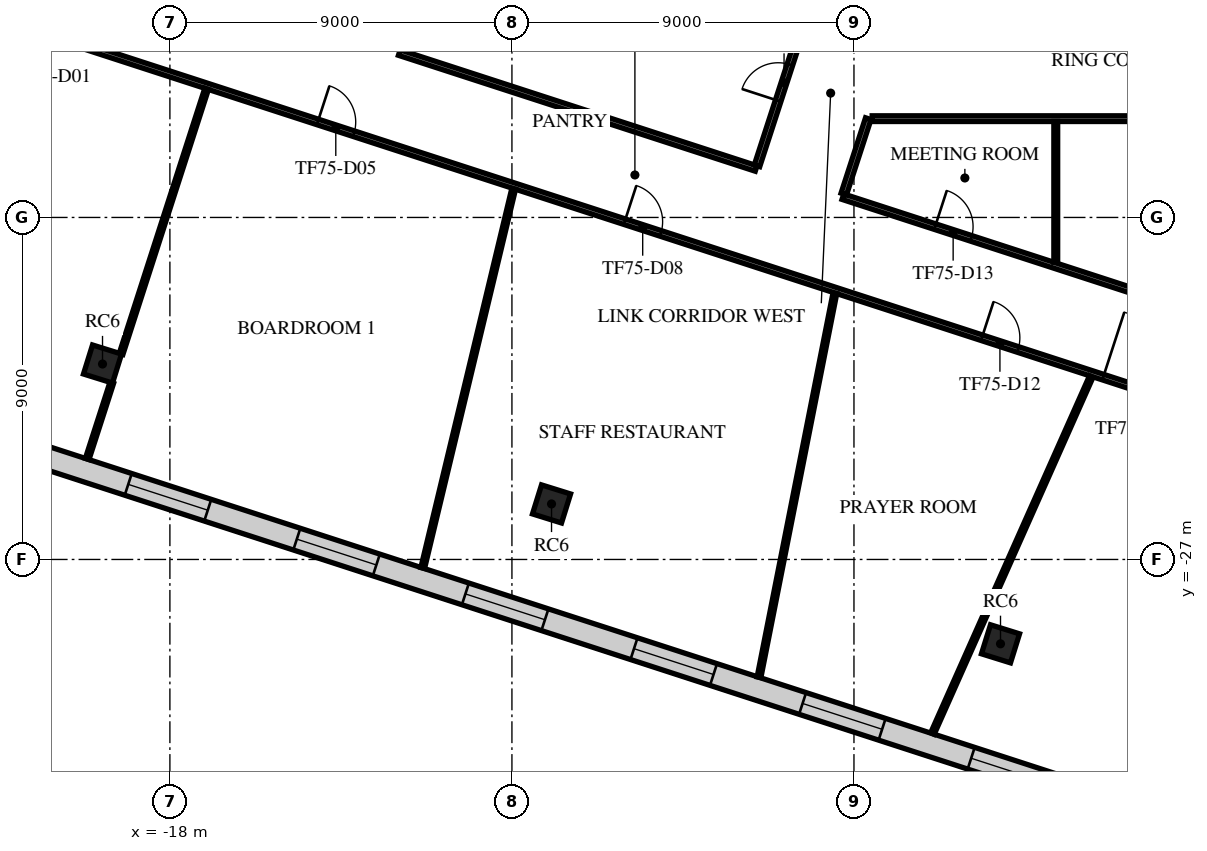
"""IFC4 building model, lengths in metres.
Left out: names, types, materials, properties, quantities, classifications, styles, units other than length and angle.
Written with IfcOpenShell. Run it as: python <this file> out.ifc"""

import sys

from ifc_helpers import new_model, si_unit, direction, frame, frame_2d, origin, origin_2d, place, context, subcontext, project, spatial, rectangle, extrude, element, fill, save


model = new_model("IFC4")
c1 = context("Model", 3, precision=1e-05, world=origin(), true_north=direction((0.0, 1.0)))
c2 = subcontext(c1, "Body", "Model", "MODEL_VIEW")
j1 = project(units=[si_unit("LENGTHUNIT", "METRE"), si_unit("PLANEANGLEUNIT", "RADIAN")], contexts=[c1])
p1 = place(None, origin())
s1 = spatial("IfcSite", under=j1, at=p1, CompositionType="ELEMENT")
p2 = place(p1, origin())
s2 = spatial("IfcBuilding", under=s1, at=p2, CompositionType="ELEMENT")
p3 = place(p2, frame((0.0, 0.0, 316.5)))
s3 = spatial("IfcBuildingStorey", under=s2, at=p3, CompositionType="ELEMENT", Elevation=316.5)
for number, where, z_axis, x_axis in (
    (1, (-19.773, -21.857, 0.0), (0.0, 0.0, 1.0), (0.298, 0.955, 0.0)),
    (2, (-7.958, -25.539, 0.0), (0.0, 0.0, 1.0), (0.298, 0.955, 0.0)),
    (3, (3.856, -29.22, 0.0), (0.0, 0.0, 1.0), (0.298, 0.955, 0.0)),
):
    element("IfcColumn", number, at=place(p3, frame(where, z_axis=z_axis, x_axis=x_axis)), inside=s3, PredefinedType="COLUMN", context=c2, shape_type="SweptSolid", body=[
        extrude(rectangle(XDim=0.8, YDim=0.8, at=origin_2d()), origin(), (0.0, 0.0, 1.0), 4.0),
    ])
p4 = place(p3, frame((-17.822, 31.552, 0.0), z_axis=(0.0, 0.0, 1.0), x_axis=(-0.309018218247, -0.951056118634, 0.0)))
e4 = element("IfcWall", 4, at=p4, inside=s3, PredefinedType="STANDARD", context=c2, shape_type="SweptSolid", body=[
    extrude(rectangle(XDim=48.49, YDim=0.6, at=frame_2d((24.245, 0.0))), origin(), (0.0, 0.0, 1.0), 3.65),
])
p5 = place(p4, frame((1.204, 0.0, 0.9)))
e5 = element("IfcOpeningElement", 5, at=p5, cuts=e4, PredefinedType="OPENING", context=c2, shape_type="SweptSolid", body=[
    extrude(rectangle(XDim=2.0, YDim=2.1, at=frame_2d((1.0, 1.05))), frame((0.0, 0.31, 0.0), z_axis=(0.0, -1.0, 0.0), x_axis=(1.0, 0.0, 0.0)), (0.0, 0.0, 1.0), 0.62),
])
p6 = place(p4, frame((5.612, 0.0, 0.9)))
e6 = element("IfcOpeningElement", 6, at=p6, cuts=e4, PredefinedType="OPENING", context=c2, shape_type="SweptSolid", body=[
    extrude(rectangle(XDim=2.0, YDim=2.1, at=frame_2d((1.0, 1.05))), frame((0.0, 0.31, 0.0), z_axis=(0.0, -1.0, 0.0), x_axis=(1.0, 0.0, 0.0)), (0.0, 0.0, 1.0), 0.62),
])
p7 = place(p4, frame((10.021, 0.0, 0.9)))
e7 = element("IfcOpeningElement", 7, at=p7, cuts=e4, PredefinedType="OPENING", context=c2, shape_type="SweptSolid", body=[
    extrude(rectangle(XDim=2.0, YDim=2.1, at=frame_2d((1.0, 1.05))), frame((0.0, 0.31, 0.0), z_axis=(0.0, -1.0, 0.0), x_axis=(1.0, 0.0, 0.0)), (0.0, 0.0, 1.0), 0.62),
])
p8 = place(p4, frame((14.428, 0.0, 0.9)))
e8 = element("IfcOpeningElement", 8, at=p8, cuts=e4, PredefinedType="OPENING", context=c2, shape_type="SweptSolid", body=[
    extrude(rectangle(XDim=2.0, YDim=2.1, at=frame_2d((1.0, 1.05))), frame((0.0, 0.31, 0.0), z_axis=(0.0, -1.0, 0.0), x_axis=(1.0, 0.0, 0.0)), (0.0, 0.0, 1.0), 0.62),
])
p9 = place(p4, frame((18.837, 0.0, 0.9)))
e9 = element("IfcOpeningElement", 9, at=p9, cuts=e4, PredefinedType="OPENING", context=c2, shape_type="SweptSolid", body=[
    extrude(rectangle(XDim=2.0, YDim=2.1, at=frame_2d((1.0, 1.05))), frame((0.0, 0.31, 0.0), z_axis=(0.0, -1.0, 0.0), x_axis=(1.0, 0.0, 0.0)), (0.0, 0.0, 1.0), 0.62),
])
p10 = place(p4, frame((23.245, 0.0, 0.9)))
e10 = element("IfcOpeningElement", 10, at=p10, cuts=e4, PredefinedType="OPENING", context=c2, shape_type="SweptSolid", body=[
    extrude(rectangle(XDim=2.0, YDim=2.1, at=frame_2d((1.0, 1.05))), frame((0.0, 0.31, 0.0), z_axis=(0.0, -1.0, 0.0), x_axis=(1.0, 0.0, 0.0)), (0.0, 0.0, 1.0), 0.62),
])
p11 = place(p4, frame((27.653, 0.0, 0.9)))
e11 = element("IfcOpeningElement", 11, at=p11, cuts=e4, PredefinedType="OPENING", context=c2, shape_type="SweptSolid", body=[
    extrude(rectangle(XDim=2.0, YDim=2.1, at=frame_2d((1.0, 1.05))), frame((0.0, 0.31, 0.0), z_axis=(0.0, -1.0, 0.0), x_axis=(1.0, 0.0, 0.0)), (0.0, 0.0, 1.0), 0.62),
])
p12 = place(p4, frame((32.061, 0.0, 0.9)))
e12 = element("IfcOpeningElement", 12, at=p12, cuts=e4, PredefinedType="OPENING", context=c2, shape_type="SweptSolid", body=[
    extrude(rectangle(XDim=2.0, YDim=2.1, at=frame_2d((1.0, 1.05))), frame((0.0, 0.31, 0.0), z_axis=(0.0, -1.0, 0.0), x_axis=(1.0, 0.0, 0.0)), (0.0, 0.0, 1.0), 0.62),
])
p13 = place(p4, frame((36.469, 0.0, 0.9)))
e13 = element("IfcOpeningElement", 13, at=p13, cuts=e4, PredefinedType="OPENING", context=c2, shape_type="SweptSolid", body=[
    extrude(rectangle(XDim=2.0, YDim=2.1, at=frame_2d((1.0, 1.05))), frame((0.0, 0.31, 0.0), z_axis=(0.0, -1.0, 0.0), x_axis=(1.0, 0.0, 0.0)), (0.0, 0.0, 1.0), 0.62),
])
p14 = place(p4, frame((40.877, 0.0, 0.9)))
e14 = element("IfcOpeningElement", 14, at=p14, cuts=e4, PredefinedType="OPENING", context=c2, shape_type="SweptSolid", body=[
    extrude(rectangle(XDim=2.0, YDim=2.1, at=frame_2d((1.0, 1.05))), frame((0.0, 0.31, 0.0), z_axis=(0.0, -1.0, 0.0), x_axis=(1.0, 0.0, 0.0)), (0.0, 0.0, 1.0), 0.62),
])
p15 = place(p4, frame((45.285, 0.0, 0.9)))
e15 = element("IfcOpeningElement", 15, at=p15, cuts=e4, PredefinedType="OPENING", context=c2, shape_type="SweptSolid", body=[
    extrude(rectangle(XDim=2.0, YDim=2.1, at=frame_2d((1.0, 1.05))), frame((0.0, 0.31, 0.0), z_axis=(0.0, -1.0, 0.0), x_axis=(1.0, 0.0, 0.0)), (0.0, 0.0, 1.0), 0.62),
])
p16 = place(p3, frame((-29.14, -21.76, 0.0), z_axis=(0.0, 0.0, 1.0), x_axis=(0.951057273207, -0.309014664831, 0.0)))
e16 = element("IfcWall", 16, at=p16, inside=s3, PredefinedType="STANDARD", context=c2, shape_type="SweptSolid", body=[
    extrude(rectangle(XDim=41.979, YDim=0.6, at=frame_2d((20.99, 0.0))), origin(), (0.0, 0.0, 1.0), 3.65),
])
p17 = place(p16, frame((1.232, 0.0, 0.9)))
e17 = element("IfcOpeningElement", 17, at=p17, cuts=e16, PredefinedType="OPENING", context=c2, shape_type="SweptSolid", body=[
    extrude(rectangle(XDim=2.2, YDim=2.1, at=frame_2d((1.1, 1.05))), frame((0.0, 0.31, 0.0), z_axis=(0.0, -1.0, 0.0), x_axis=(1.0, 0.0, 0.0)), (0.0, 0.0, 1.0), 0.62),
])
p18 = place(p16, frame((5.896, 0.0, 0.9)))
e18 = element("IfcOpeningElement", 18, at=p18, cuts=e16, PredefinedType="OPENING", context=c2, shape_type="SweptSolid", body=[
    extrude(rectangle(XDim=2.2, YDim=2.1, at=frame_2d((1.1, 1.05))), frame((0.0, 0.31, 0.0), z_axis=(0.0, -1.0, 0.0), x_axis=(1.0, 0.0, 0.0)), (0.0, 0.0, 1.0), 0.62),
])
p19 = place(p16, frame((10.561, 0.0, 0.9)))
e19 = element("IfcOpeningElement", 19, at=p19, cuts=e16, PredefinedType="OPENING", context=c2, shape_type="SweptSolid", body=[
    extrude(rectangle(XDim=2.2, YDim=2.1, at=frame_2d((1.1, 1.05))), frame((0.0, 0.31, 0.0), z_axis=(0.0, -1.0, 0.0), x_axis=(1.0, 0.0, 0.0)), (0.0, 0.0, 1.0), 0.62),
])
p20 = place(p16, frame((15.225, 0.0, 0.9)))
e20 = element("IfcOpeningElement", 20, at=p20, cuts=e16, PredefinedType="OPENING", context=c2, shape_type="SweptSolid", body=[
    extrude(rectangle(XDim=2.2, YDim=2.1, at=frame_2d((1.1, 1.05))), frame((0.0, 0.31, 0.0), z_axis=(0.0, -1.0, 0.0), x_axis=(1.0, 0.0, 0.0)), (0.0, 0.0, 1.0), 0.62),
])
p21 = place(p16, frame((19.89, 0.0, 0.9)))
e21 = element("IfcOpeningElement", 21, at=p21, cuts=e16, PredefinedType="OPENING", context=c2, shape_type="SweptSolid", body=[
    extrude(rectangle(XDim=2.2, YDim=2.1, at=frame_2d((1.1, 1.05))), frame((0.0, 0.31, 0.0), z_axis=(0.0, -1.0, 0.0), x_axis=(1.0, 0.0, 0.0)), (0.0, 0.0, 1.0), 0.62),
])
p22 = place(p16, frame((24.554, 0.0, 0.9)))
e22 = element("IfcOpeningElement", 22, at=p22, cuts=e16, PredefinedType="OPENING", context=c2, shape_type="SweptSolid", body=[
    extrude(rectangle(XDim=2.2, YDim=2.1, at=frame_2d((1.1, 1.05))), frame((0.0, 0.31, 0.0), z_axis=(0.0, -1.0, 0.0), x_axis=(1.0, 0.0, 0.0)), (0.0, 0.0, 1.0), 0.62),
])
p23 = place(p16, frame((29.218, 0.0, 0.9)))
e23 = element("IfcOpeningElement", 23, at=p23, cuts=e16, PredefinedType="OPENING", context=c2, shape_type="SweptSolid", body=[
    extrude(rectangle(XDim=2.2, YDim=2.1, at=frame_2d((1.1, 1.05))), frame((0.0, 0.31, 0.0), z_axis=(0.0, -1.0, 0.0), x_axis=(1.0, 0.0, 0.0)), (0.0, 0.0, 1.0), 0.62),
])
p24 = place(p16, frame((33.883, 0.0, 0.9)))
e24 = element("IfcOpeningElement", 24, at=p24, cuts=e16, PredefinedType="OPENING", context=c2, shape_type="SweptSolid", body=[
    extrude(rectangle(XDim=2.2, YDim=2.1, at=frame_2d((1.1, 1.05))), frame((0.0, 0.31, 0.0), z_axis=(0.0, -1.0, 0.0), x_axis=(1.0, 0.0, 0.0)), (0.0, 0.0, 1.0), 0.62),
])
p25 = place(p16, frame((38.547, 0.0, 0.9)))
e25 = element("IfcOpeningElement", 25, at=p25, cuts=e16, PredefinedType="OPENING", context=c2, shape_type="SweptSolid", body=[
    extrude(rectangle(XDim=2.2, YDim=2.1, at=frame_2d((1.1, 1.05))), frame((0.0, 0.31, 0.0), z_axis=(0.0, -1.0, 0.0), x_axis=(1.0, 0.0, 0.0)), (0.0, 0.0, 1.0), 0.62),
])
p26 = place(p3, frame((-22.763, -12.676, 0.0), z_axis=(0.0, 0.0, 1.0), x_axis=(0.951055018443, -0.309021604252, 0.0)))
e26 = element("IfcWall", 26, at=p26, inside=s3, PredefinedType="PARTITIONING", context=c2, shape_type="SweptSolid", body=[
    extrude(rectangle(XDim=35.537, YDim=0.15, at=frame_2d((17.769, 0.0))), origin(), (0.0, 0.0, 1.0), 3.25),
])
p27 = place(p26, frame((0.8, 0.0, 0.0)))
e27 = element("IfcOpeningElement", 27, at=p27, cuts=e26, PredefinedType="OPENING", context=c2, shape_type="SweptSolid", body=[
    extrude(rectangle(XDim=1.8, YDim=2.1, at=frame_2d((0.9, 1.05))), frame((0.0, 0.085, 0.0), z_axis=(0.0, -1.0, 0.0), x_axis=(1.0, 0.0, 0.0)), (0.0, 0.0, 1.0), 0.17),
])
p28 = place(p26, frame((9.098, 0.0, 0.0)))
e28 = element("IfcOpeningElement", 28, at=p28, cuts=e26, PredefinedType="OPENING", context=c2, shape_type="SweptSolid", body=[
    extrude(rectangle(XDim=1.0, YDim=2.1, at=frame_2d((0.5, 1.05))), frame((0.0, 0.085, 0.0), z_axis=(0.0, -1.0, 0.0), x_axis=(1.0, 0.0, 0.0)), (0.0, 0.0, 1.0), 0.17),
])
p29 = place(p26, frame((17.589, 0.0, 0.0)))
e29 = element("IfcOpeningElement", 29, at=p29, cuts=e26, PredefinedType="OPENING", context=c2, shape_type="SweptSolid", body=[
    extrude(rectangle(XDim=1.0, YDim=2.1, at=frame_2d((0.5, 1.05))), frame((0.0, 0.085, 0.0), z_axis=(0.0, -1.0, 0.0), x_axis=(1.0, 0.0, 0.0)), (0.0, 0.0, 1.0), 0.17),
])
p30 = place(p26, frame((27.473, 0.0, 0.0)))
e30 = element("IfcOpeningElement", 30, at=p30, cuts=e26, PredefinedType="OPENING", context=c2, shape_type="SweptSolid", body=[
    extrude(rectangle(XDim=1.0, YDim=2.1, at=frame_2d((0.5, 1.05))), frame((0.0, 0.085, 0.0), z_axis=(0.0, -1.0, 0.0), x_axis=(1.0, 0.0, 0.0)), (0.0, 0.0, 1.0), 0.17),
])
p31 = place(p26, frame((30.83, 0.0, 0.0)))
e31 = element("IfcOpeningElement", 31, at=p31, cuts=e26, PredefinedType="OPENING", context=c2, shape_type="SweptSolid", body=[
    extrude(rectangle(XDim=1.8, YDim=2.1, at=frame_2d((0.9, 1.05))), frame((0.0, 0.085, 0.0), z_axis=(0.0, -1.0, 0.0), x_axis=(1.0, 0.0, 0.0)), (0.0, 0.0, 1.0), 0.17),
])
p32 = place(p3, frame((-11.963, -13.662, 0.0), z_axis=(0.0, 0.0, 1.0), x_axis=(0.951081492471, -0.308940115036, 0.0)))
e32 = element("IfcWall", 32, at=p32, inside=s3, PredefinedType="PARTITIONING", context=c2, shape_type="SweptSolid", body=[
    extrude(rectangle(XDim=9.872, YDim=0.15, at=frame_2d((4.936, 0.0))), origin(), (0.0, 0.0, 1.0), 3.25),
])
p33 = place(p3, frame((-2.551, -16.641, 0.0), z_axis=(0.0, 0.0, 1.0), x_axis=(0.309172730038, 0.951005900613, 0.0)))
e33 = element("IfcWall", 33, at=p33, inside=s3, PredefinedType="PARTITIONING", context=c2, shape_type="SweptSolid", body=[
    extrude(rectangle(XDim=4.459, YDim=0.15, at=frame_2d((2.229, 0.0))), origin(), (0.0, 0.0, 1.0), 3.25),
])
p34 = place(p33, frame((1.8, 0.0, 0.0)))
e34 = element("IfcOpeningElement", 34, at=p34, cuts=e33, PredefinedType="OPENING", context=c2, shape_type="SweptSolid", body=[
    extrude(rectangle(XDim=1.0, YDim=2.1, at=frame_2d((0.5, 1.05))), frame((0.0, 0.085, 0.0), z_axis=(0.0, -1.0, 0.0), x_axis=(1.0, 0.0, 0.0)), (0.0, 0.0, 1.0), 0.17),
])
p35 = place(p3, frame((-0.291, -17.454, 0.0), z_axis=(0.0, 0.0, 1.0), x_axis=(0.951062767237, -0.308997755292, 0.0)))
e35 = element("IfcWall", 35, at=p35, inside=s3, PredefinedType="PARTITIONING", context=c2, shape_type="SweptSolid", body=[
    extrude(rectangle(XDim=12.689, YDim=0.15, at=frame_2d((6.344, 0.0))), origin(), (0.0, 0.0, 1.0), 3.25),
])
p36 = place(p35, frame((2.55, 0.0, 0.0)))
e36 = element("IfcOpeningElement", 36, at=p36, cuts=e35, PredefinedType="OPENING", context=c2, shape_type="SweptSolid", body=[
    extrude(rectangle(XDim=1.0, YDim=2.1, at=frame_2d((0.5, 1.05))), frame((0.0, 0.085, 0.0), z_axis=(0.0, -1.0, 0.0), x_axis=(1.0, 0.0, 0.0)), (0.0, 0.0, 1.0), 0.17),
])
p37 = place(p3, frame((-0.268, -17.383, 0.0), z_axis=(0.0, 0.0, 1.0), x_axis=(0.308805378048, 0.951125248581, 0.0)))
e37 = element("IfcWall", 37, at=p37, inside=s3, PredefinedType="PARTITIONING", context=c2, shape_type="SweptSolid", body=[
    extrude(rectangle(XDim=2.085, YDim=0.15, at=frame_2d((1.042, 0.0))), origin(), (0.0, 0.0, 1.0), 3.65),
])
p38 = place(p3, frame((0.479, -15.4, 0.0), z_axis=(0.0, 0.0, 1.0), x_axis=(1.0, 0.0, 0.0)))
e38 = element("IfcWall", 38, at=p38, inside=s3, PredefinedType="PARTITIONING", context=c2, shape_type="SweptSolid", body=[
    extrude(rectangle(XDim=14.921, YDim=0.15, at=frame_2d((7.46, 0.0))), origin(), (0.0, 0.0, 1.0), 3.25),
])
p39 = place(p3, frame((-20.176, -24.355, 0.0), z_axis=(0.0, 0.0, 1.0), x_axis=(0.307097655816, 0.951678007412, 0.0)))
e39 = element("IfcWall", 39, at=p39, inside=s3, PredefinedType="PARTITIONING", context=c2, shape_type="SweptSolid", body=[
    extrude(rectangle(XDim=2.105, YDim=0.1, at=frame_2d((1.053, 0.0))), origin(), (0.0, 0.0, 1.0), 3.65),
])
p40 = place(p3, frame((-19.284, -21.59, 0.0), z_axis=(0.0, 0.0, 1.0), x_axis=(0.307047557854, 0.951694172103, 0.0)))
e40 = element("IfcWall", 40, at=p40, inside=s3, PredefinedType="PARTITIONING", context=c2, shape_type="SweptSolid", body=[
    extrude(rectangle(XDim=7.328, YDim=0.1, at=frame_2d((3.664, 0.0))), origin(), (0.0, 0.0, 1.0), 3.25),
])
p41 = place(p3, frame((-11.347, -27.224, 0.0), z_axis=(0.0, 0.0, 1.0), x_axis=(0.233270362444, 0.972411917865, 0.0)))
e41 = element("IfcWall", 41, at=p41, inside=s3, PredefinedType="PARTITIONING", context=c2, shape_type="SweptSolid", body=[
    extrude(rectangle(XDim=10.261, YDim=0.1, at=frame_2d((5.13, 0.0))), origin(), (0.0, 0.0, 1.0), 3.05),
])
p42 = place(p3, frame((-2.498, -30.099, 0.0), z_axis=(0.0, 0.0, 1.0), x_axis=(0.193832041147, 0.981034729164, 0.0)))
e42 = element("IfcWall", 42, at=p42, inside=s3, PredefinedType="PARTITIONING", context=c2, shape_type="SweptSolid", body=[
    extrude(rectangle(XDim=10.301, YDim=0.1, at=frame_2d((5.15, 0.0))), origin(), (0.0, 0.0, 1.0), 3.05),
])
p43 = place(p3, frame((2.065, -31.582, 0.0), z_axis=(0.0, 0.0, 1.0), x_axis=(0.406398376822, 0.913695988454, 0.0)))
e43 = element("IfcWall", 43, at=p43, inside=s3, PredefinedType="PARTITIONING", context=c2, shape_type="SweptSolid", body=[
    extrude(rectangle(XDim=10.283, YDim=0.1, at=frame_2d((5.142, 0.0))), origin(), (0.0, 0.0, 1.0), 3.05),
])
p44 = place(p3, frame((5.31, -19.179, 0.0), z_axis=(0.0, 0.0, 1.0), x_axis=(0.0, 1.0, 0.0)))
e44 = element("IfcWall", 44, at=p44, inside=s3, PredefinedType="PARTITIONING", context=c2, shape_type="SweptSolid", body=[
    extrude(rectangle(XDim=3.704, YDim=0.1, at=frame_2d((1.852, 0.0))), origin(), (0.0, 0.0, 1.0), 3.65),
])
p45 = place(p19, origin())
e45 = element("IfcWindow", 45, at=p45, inside=s3, PartitioningType="SINGLE_PANEL", PredefinedType="WINDOW", context=c2, shape_type="SweptSolid", body=[
    extrude(rectangle(XDim=2.2, YDim=2.1, at=frame_2d((1.1, 1.05))), frame((0.0, 0.03, 0.0), z_axis=(0.0, -1.0, 0.0), x_axis=(1.0, 0.0, 0.0)), (0.0, 0.0, 1.0), 0.06),
])
fill(e19, e45)
p46 = place(p20, origin())
e46 = element("IfcWindow", 46, at=p46, inside=s3, PartitioningType="SINGLE_PANEL", PredefinedType="WINDOW", context=c2, shape_type="SweptSolid", body=[
    extrude(rectangle(XDim=2.2, YDim=2.1, at=frame_2d((1.1, 1.05))), frame((0.0, 0.03, 0.0), z_axis=(0.0, -1.0, 0.0), x_axis=(1.0, 0.0, 0.0)), (0.0, 0.0, 1.0), 0.06),
])
fill(e20, e46)
p47 = place(p21, origin())
e47 = element("IfcWindow", 47, at=p47, inside=s3, PartitioningType="SINGLE_PANEL", PredefinedType="WINDOW", context=c2, shape_type="SweptSolid", body=[
    extrude(rectangle(XDim=2.2, YDim=2.1, at=frame_2d((1.1, 1.05))), frame((0.0, 0.03, 0.0), z_axis=(0.0, -1.0, 0.0), x_axis=(1.0, 0.0, 0.0)), (0.0, 0.0, 1.0), 0.06),
])
fill(e21, e47)
p48 = place(p22, origin())
e48 = element("IfcWindow", 48, at=p48, inside=s3, PartitioningType="SINGLE_PANEL", PredefinedType="WINDOW", context=c2, shape_type="SweptSolid", body=[
    extrude(rectangle(XDim=2.2, YDim=2.1, at=frame_2d((1.1, 1.05))), frame((0.0, 0.03, 0.0), z_axis=(0.0, -1.0, 0.0), x_axis=(1.0, 0.0, 0.0)), (0.0, 0.0, 1.0), 0.06),
])
fill(e22, e48)
p49 = place(p23, origin())
e49 = element("IfcWindow", 49, at=p49, inside=s3, PartitioningType="SINGLE_PANEL", PredefinedType="WINDOW", context=c2, shape_type="SweptSolid", body=[
    extrude(rectangle(XDim=2.2, YDim=2.1, at=frame_2d((1.1, 1.05))), frame((0.0, 0.03, 0.0), z_axis=(0.0, -1.0, 0.0), x_axis=(1.0, 0.0, 0.0)), (0.0, 0.0, 1.0), 0.06),
])
fill(e23, e49)
p50 = place(p24, origin())
e50 = element("IfcWindow", 50, at=p50, inside=s3, PartitioningType="SINGLE_PANEL", PredefinedType="WINDOW", context=c2, shape_type="SweptSolid", body=[
    extrude(rectangle(XDim=2.2, YDim=2.1, at=frame_2d((1.1, 1.05))), frame((0.0, 0.03, 0.0), z_axis=(0.0, -1.0, 0.0), x_axis=(1.0, 0.0, 0.0)), (0.0, 0.0, 1.0), 0.06),
])
fill(e24, e50)
p51 = place(p28, frame((1.0, 0.0, 0.0), z_axis=(0.0, 0.0, 1.0), x_axis=(-1.0, 0.0, 0.0)))
e51 = element("IfcDoor", 51, at=p51, inside=s3, OperationType="SINGLE_SWING_RIGHT", PredefinedType="DOOR", context=c2, shape_type="SweptSolid", body=[
    extrude(rectangle(XDim=1.0, YDim=2.1, at=frame_2d((0.5, 1.05))), frame((0.0, 0.025, 0.0), z_axis=(0.0, -1.0, 0.0), x_axis=(1.0, 0.0, 0.0)), (0.0, 0.0, 1.0), 0.05),
])
fill(e28, e51)
p52 = place(p29, frame((1.0, 0.0, 0.0), z_axis=(0.0, 0.0, 1.0), x_axis=(-1.0, 0.0, 0.0)))
e52 = element("IfcDoor", 52, at=p52, inside=s3, OperationType="SINGLE_SWING_RIGHT", PredefinedType="DOOR", context=c2, shape_type="SweptSolid", body=[
    extrude(rectangle(XDim=1.0, YDim=2.1, at=frame_2d((0.5, 1.05))), frame((0.0, 0.025, 0.0), z_axis=(0.0, -1.0, 0.0), x_axis=(1.0, 0.0, 0.0)), (0.0, 0.0, 1.0), 0.05),
])
fill(e29, e52)
p53 = place(p34, origin())
e53 = element("IfcDoor", 53, at=p53, inside=s3, OperationType="SINGLE_SWING_LEFT", PredefinedType="DOOR", context=c2, shape_type="SweptSolid", body=[
    extrude(rectangle(XDim=1.0, YDim=2.1, at=frame_2d((0.5, 1.05))), frame((0.0, 0.025, 0.0), z_axis=(0.0, -1.0, 0.0), x_axis=(1.0, 0.0, 0.0)), (0.0, 0.0, 1.0), 0.05),
])
fill(e34, e53)
p54 = place(p30, frame((1.0, 0.0, 0.0), z_axis=(0.0, 0.0, 1.0), x_axis=(-1.0, 0.0, 0.0)))
e54 = element("IfcDoor", 54, at=p54, inside=s3, OperationType="SINGLE_SWING_RIGHT", PredefinedType="DOOR", context=c2, shape_type="SweptSolid", body=[
    extrude(rectangle(XDim=1.0, YDim=2.1, at=frame_2d((0.5, 1.05))), frame((0.0, 0.025, 0.0), z_axis=(0.0, -1.0, 0.0), x_axis=(1.0, 0.0, 0.0)), (0.0, 0.0, 1.0), 0.05),
])
fill(e30, e54)
p55 = place(p36, origin())
e55 = element("IfcDoor", 55, at=p55, inside=s3, OperationType="SINGLE_SWING_RIGHT", PredefinedType="DOOR", context=c2, shape_type="SweptSolid", body=[
    extrude(rectangle(XDim=1.0, YDim=2.1, at=frame_2d((0.5, 1.05))), frame((0.0, 0.025, 0.0), z_axis=(0.0, -1.0, 0.0), x_axis=(1.0, 0.0, 0.0)), (0.0, 0.0, 1.0), 0.05),
])
fill(e36, e55)
p56 = place(p31, frame((1.8, 0.0, 0.0), z_axis=(0.0, 0.0, 1.0), x_axis=(-1.0, 0.0, 0.0)))
e56 = element("IfcDoor", 56, at=p56, inside=s3, OperationType="DOUBLE_DOOR_SINGLE_SWING", PredefinedType="DOOR", context=c2, shape_type="SweptSolid", body=[
    extrude(rectangle(XDim=1.8, YDim=2.1, at=frame_2d((0.9, 1.05))), frame((0.0, 0.025, 0.0), z_axis=(0.0, -1.0, 0.0), x_axis=(1.0, 0.0, 0.0)), (0.0, 0.0, 1.0), 0.05),
])
fill(e31, e56)
save(model, sys.argv[1])
